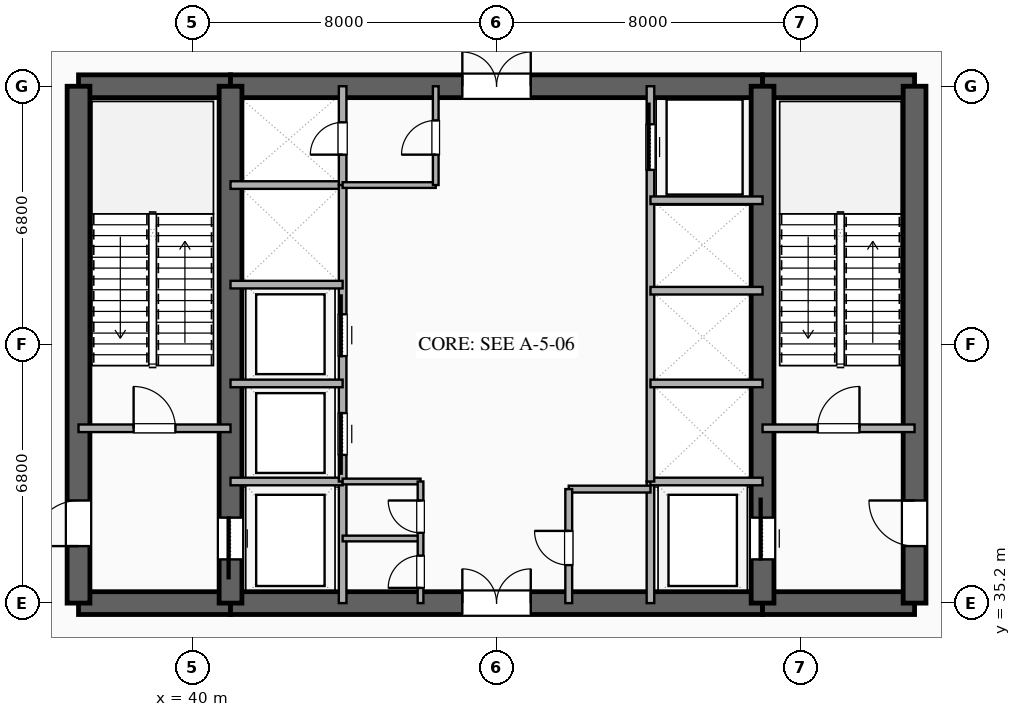
"""IFC4 building model, lengths in metres.
Left out: names, types, materials, properties, quantities, classifications, styles, units other than length and angle.
Written with IfcOpenShell. Run it as: python <this file> out.ifc"""

import sys

from ifc_helpers import new_model, si_unit, direction, frame, frame_2d, origin, place, context, subcontext, project, spatial, rectangle, extrude, element, fill, save


model = new_model("IFC4")
c1 = context("Model", 3, precision=1e-05, world=origin(), true_north=direction((0.0, 1.0)))
c2 = subcontext(c1, "Body", "Model", "MODEL_VIEW")
j1 = project(units=[si_unit("LENGTHUNIT", "METRE"), si_unit("PLANEANGLEUNIT", "RADIAN")], contexts=[c1])
p1 = place(None, origin())
s1 = spatial("IfcSite", under=j1, at=p1, CompositionType="ELEMENT")
p2 = place(p1, origin())
s2 = spatial("IfcBuilding", under=s1, at=p2, CompositionType="ELEMENT")
p3 = place(p2, frame((0.0, 0.0, 16.8)))
s3 = spatial("IfcBuildingStorey", under=s2, at=p3, CompositionType="ELEMENT", Elevation=16.8)
p4 = place(p3, frame((37.0, 35.2, 0.0), z_axis=(0.0, 0.0, 1.0), x_axis=(1.0, 0.0, 0.0)))
e1 = element("IfcWall", 1, at=p4, inside=s3, PredefinedType="SHEAR", context=c2, shape_type="SweptSolid", body=[
    extrude(rectangle(XDim=4.0, YDim=0.6, at=frame_2d((2.0, 0.0))), origin(), (0.0, 0.0, 1.0), 5.05),
])
p5 = place(p3, frame((41.0, 35.2, 0.0), z_axis=(0.0, 0.0, 1.0), x_axis=(1.0, 0.0, 0.0)))
e2 = element("IfcWall", 2, at=p5, inside=s3, PredefinedType="SHEAR", context=c2, shape_type="SweptSolid", body=[
    extrude(rectangle(XDim=14.0, YDim=0.6, at=frame_2d((7.0, 0.0))), origin(), (0.0, 0.0, 1.0), 5.05),
])
p6 = place(p5, frame((6.1, 0.0, 0.0)))
e3 = element("IfcOpeningElement", 3, at=p6, cuts=e2, PredefinedType="OPENING", context=c2, shape_type="SweptSolid", body=[
    extrude(rectangle(XDim=1.8, YDim=2.25, at=frame_2d((0.9, 1.125))), frame((0.0, 0.31, 0.0), z_axis=(0.0, -1.0, 0.0), x_axis=(1.0, 0.0, 0.0)), (0.0, 0.0, 1.0), 0.62),
])
for number, where, z_axis, x_axis in (
    (4, (55.0, 35.2, 0.0), (0.0, 0.0, 1.0), (1.0, 0.0, 0.0)),
    (5, (37.0, 48.8, 0.0), (0.0, 0.0, 1.0), (1.0, 0.0, 0.0)),
):
    element("IfcWall", number, at=place(p3, frame(where, z_axis=z_axis, x_axis=x_axis)), inside=s3, PredefinedType="SHEAR", context=c2, shape_type="SweptSolid", body=[
        extrude(rectangle(XDim=4.0, YDim=0.6, at=frame_2d((2.0, 0.0))), origin(), (0.0, 0.0, 1.0), 5.05),
    ])
p7 = place(p3, frame((41.0, 48.8, 0.0), z_axis=(0.0, 0.0, 1.0), x_axis=(1.0, 0.0, 0.0)))
e6 = element("IfcWall", 6, at=p7, inside=s3, PredefinedType="SHEAR", context=c2, shape_type="SweptSolid", body=[
    extrude(rectangle(XDim=14.0, YDim=0.6, at=frame_2d((7.0, 0.0))), origin(), (0.0, 0.0, 1.0), 5.05),
])
p8 = place(p7, frame((6.1, 0.0, 0.0)))
e7 = element("IfcOpeningElement", 7, at=p8, cuts=e6, PredefinedType="OPENING", context=c2, shape_type="SweptSolid", body=[
    extrude(rectangle(XDim=1.8, YDim=2.25, at=frame_2d((0.9, 1.125))), frame((0.0, 0.31, 0.0), z_axis=(0.0, -1.0, 0.0), x_axis=(1.0, 0.0, 0.0)), (0.0, 0.0, 1.0), 0.62),
])
p9 = place(p3, frame((55.0, 48.8, 0.0), z_axis=(0.0, 0.0, 1.0), x_axis=(1.0, 0.0, 0.0)))
e8 = element("IfcWall", 8, at=p9, inside=s3, PredefinedType="SHEAR", context=c2, shape_type="SweptSolid", body=[
    extrude(rectangle(XDim=4.0, YDim=0.6, at=frame_2d((2.0, 0.0))), origin(), (0.0, 0.0, 1.0), 5.05),
])
p10 = place(p3, frame((37.0, 35.2, 0.0), z_axis=(0.0, 0.0, 1.0), x_axis=(0.0, 1.0, 0.0)))
e9 = element("IfcWall", 9, at=p10, inside=s3, PredefinedType="SHEAR", context=c2, shape_type="SweptSolid", body=[
    extrude(rectangle(XDim=13.6, YDim=0.6, at=frame_2d((6.8, 0.0))), origin(), (0.0, 0.0, 1.0), 5.05),
])
p11 = place(p10, frame((1.5, 0.0, 0.0)))
e10 = element("IfcOpeningElement", 10, at=p11, cuts=e9, PredefinedType="OPENING", context=c2, shape_type="SweptSolid", body=[
    extrude(rectangle(XDim=1.2, YDim=2.15, at=frame_2d((0.6, 1.075))), frame((0.0, 0.31, 0.0), z_axis=(0.0, -1.0, 0.0), x_axis=(1.0, 0.0, 0.0)), (0.0, 0.0, 1.0), 0.62),
])
p12 = place(p3, frame((59.0, 35.2, 0.0), z_axis=(0.0, 0.0, 1.0), x_axis=(0.0, 1.0, 0.0)))
e11 = element("IfcWall", 11, at=p12, inside=s3, PredefinedType="SHEAR", context=c2, shape_type="SweptSolid", body=[
    extrude(rectangle(XDim=13.6, YDim=0.6, at=frame_2d((6.8, 0.0))), origin(), (0.0, 0.0, 1.0), 5.05),
])
p13 = place(p12, frame((1.5, 0.0, 0.0)))
e12 = element("IfcOpeningElement", 12, at=p13, cuts=e11, PredefinedType="OPENING", context=c2, shape_type="SweptSolid", body=[
    extrude(rectangle(XDim=1.2, YDim=2.15, at=frame_2d((0.6, 1.075))), frame((0.0, 0.31, 0.0), z_axis=(0.0, -1.0, 0.0), x_axis=(1.0, 0.0, 0.0)), (0.0, 0.0, 1.0), 0.62),
])
p14 = place(p3, frame((41.0, 35.2, 0.0), z_axis=(0.0, 0.0, 1.0), x_axis=(0.0, 1.0, 0.0)))
e13 = element("IfcWall", 13, at=p14, inside=s3, PredefinedType="SHEAR", context=c2, shape_type="SweptSolid", body=[
    extrude(rectangle(XDim=13.6, YDim=0.6, at=frame_2d((6.8, 0.0))), origin(), (0.0, 0.0, 1.0), 5.05),
])
p15 = place(p14, frame((1.15, 0.0, 0.0)))
e14 = element("IfcOpeningElement", 14, at=p15, cuts=e13, PredefinedType="OPENING", context=c2, shape_type="SweptSolid", body=[
    extrude(rectangle(XDim=1.1, YDim=2.2, at=frame_2d((0.55, 1.1))), frame((0.0, 0.31, 0.0), z_axis=(0.0, -1.0, 0.0), x_axis=(1.0, 0.0, 0.0)), (0.0, 0.0, 1.0), 0.62),
])
p16 = place(p3, frame((55.0, 35.2, 0.0), z_axis=(0.0, 0.0, 1.0), x_axis=(0.0, 1.0, 0.0)))
e15 = element("IfcWall", 15, at=p16, inside=s3, PredefinedType="SHEAR", context=c2, shape_type="SweptSolid", body=[
    extrude(rectangle(XDim=13.6, YDim=0.6, at=frame_2d((6.8, 0.0))), origin(), (0.0, 0.0, 1.0), 5.05),
])
p17 = place(p16, frame((1.15, 0.0, 0.0)))
e16 = element("IfcOpeningElement", 16, at=p17, cuts=e15, PredefinedType="OPENING", context=c2, shape_type="SweptSolid", body=[
    extrude(rectangle(XDim=1.1, YDim=2.2, at=frame_2d((0.55, 1.1))), frame((0.0, 0.31, 0.0), z_axis=(0.0, -1.0, 0.0), x_axis=(1.0, 0.0, 0.0)), (0.0, 0.0, 1.0), 0.62),
])
p18 = place(p3, frame((37.0, 39.8, 0.0), z_axis=(0.0, 0.0, 1.0), x_axis=(1.0, 0.0, 0.0)))
e17 = element("IfcWall", 17, at=p18, inside=s3, PredefinedType="SOLIDWALL", context=c2, shape_type="SweptSolid", body=[
    extrude(rectangle(XDim=4.0, YDim=0.2, at=frame_2d((2.0, 0.0))), origin(), (0.0, 0.0, 1.0), 3.65),
])
p19 = place(p18, frame((1.45, 0.0, 0.0)))
e18 = element("IfcOpeningElement", 18, at=p19, cuts=e17, PredefinedType="OPENING", context=c2, shape_type="SweptSolid", body=[
    extrude(rectangle(XDim=1.1, YDim=2.15, at=frame_2d((0.55, 1.075))), frame((0.0, 0.11, 0.0), z_axis=(0.0, -1.0, 0.0), x_axis=(1.0, 0.0, 0.0)), (0.0, 0.0, 1.0), 0.22),
])
p20 = place(p3, frame((55.0, 39.8, 0.0), z_axis=(0.0, 0.0, 1.0), x_axis=(1.0, 0.0, 0.0)))
e19 = element("IfcWall", 19, at=p20, inside=s3, PredefinedType="SOLIDWALL", context=c2, shape_type="SweptSolid", body=[
    extrude(rectangle(XDim=4.0, YDim=0.2, at=frame_2d((2.0, 0.0))), origin(), (0.0, 0.0, 1.0), 3.65),
])
p21 = place(p20, frame((1.45, 0.0, 0.0)))
e20 = element("IfcOpeningElement", 20, at=p21, cuts=e19, PredefinedType="OPENING", context=c2, shape_type="SweptSolid", body=[
    extrude(rectangle(XDim=1.1, YDim=2.15, at=frame_2d((0.55, 1.075))), frame((0.0, 0.11, 0.0), z_axis=(0.0, -1.0, 0.0), x_axis=(1.0, 0.0, 0.0)), (0.0, 0.0, 1.0), 0.22),
])
p22 = place(p3, frame((43.95, 35.2, 0.0), z_axis=(0.0, 0.0, 1.0), x_axis=(0.0, 1.0, 0.0)))
e21 = element("IfcWall", 21, at=p22, inside=s3, PredefinedType="SOLIDWALL", context=c2, shape_type="SweptSolid", body=[
    extrude(rectangle(XDim=3.2, YDim=0.2, at=frame_2d((1.6, 0.0))), origin(), (0.0, 0.0, 1.0), 3.65),
])
p23 = place(p3, frame((41.0, 38.4, 0.0), z_axis=(0.0, 0.0, 1.0), x_axis=(1.0, 0.0, 0.0)))
e22 = element("IfcWall", 22, at=p23, inside=s3, PredefinedType="SOLIDWALL", context=c2, shape_type="SweptSolid", body=[
    extrude(rectangle(XDim=2.95, YDim=0.2, at=frame_2d((1.475, 0.0))), origin(), (0.0, 0.0, 1.0), 3.65),
])
p24 = place(p3, frame((52.05, 35.2, 0.0), z_axis=(0.0, 0.0, 1.0), x_axis=(0.0, 1.0, 0.0)))
e23 = element("IfcWall", 23, at=p24, inside=s3, PredefinedType="SOLIDWALL", context=c2, shape_type="SweptSolid", body=[
    extrude(rectangle(XDim=3.2, YDim=0.2, at=frame_2d((1.6, 0.0))), origin(), (0.0, 0.0, 1.0), 3.65),
])
for number, where, z_axis, x_axis in (
    (24, (52.05, 38.4, 0.0), (0.0, 0.0, 1.0), (1.0, 0.0, 0.0)),
    (25, (41.0, 46.2, 0.0), (0.0, 0.0, 1.0), (1.0, 0.0, 0.0)),
):
    element("IfcWall", number, at=place(p3, frame(where, z_axis=z_axis, x_axis=x_axis)), inside=s3, PredefinedType="SOLIDWALL", context=c2, shape_type="SweptSolid", body=[
        extrude(rectangle(XDim=2.95, YDim=0.2, at=frame_2d((1.475, 0.0))), origin(), (0.0, 0.0, 1.0), 3.65),
    ])
p25 = place(p3, frame((43.95, 46.2, 0.0), z_axis=(0.0, 0.0, 1.0), x_axis=(0.0, 1.0, 0.0)))
e26 = element("IfcWall", 26, at=p25, inside=s3, PredefinedType="SOLIDWALL", context=c2, shape_type="SweptSolid", body=[
    extrude(rectangle(XDim=2.6, YDim=0.2, at=frame_2d((1.3, 0.0))), origin(), (0.0, 0.0, 1.0), 3.65),
])
p26 = place(p25, frame((0.8, 0.0, 0.0)))
e27 = element("IfcOpeningElement", 27, at=p26, cuts=e26, PredefinedType="OPENING", context=c2, shape_type="SweptSolid", body=[
    extrude(rectangle(XDim=0.85, YDim=2.15, at=frame_2d((0.425, 1.075))), frame((0.0, 0.11, 0.0), z_axis=(0.0, -1.0, 0.0), x_axis=(1.0, 0.0, 0.0)), (0.0, 0.0, 1.0), 0.22),
])
p27 = place(p3, frame((43.95, 38.4, 0.0), z_axis=(0.0, 0.0, 1.0), x_axis=(0.0, 1.0, 0.0)))
e28 = element("IfcWall", 28, at=p27, inside=s3, PredefinedType="SOLIDWALL", context=c2, shape_type="SweptSolid", body=[
    extrude(rectangle(XDim=7.8, YDim=0.2, at=frame_2d((3.9, 0.0))), origin(), (0.0, 0.0, 1.0), 3.65),
])
p28 = place(p27, frame((0.7, 0.0, 0.0)))
e29 = element("IfcOpeningElement", 29, at=p28, cuts=e28, PredefinedType="OPENING", context=c2, shape_type="SweptSolid", body=[
    extrude(rectangle(XDim=1.1, YDim=2.2, at=frame_2d((0.55, 1.1))), frame((0.0, 0.11, 0.0), z_axis=(0.0, -1.0, 0.0), x_axis=(1.0, 0.0, 0.0)), (0.0, 0.0, 1.0), 0.22),
])
p29 = place(p27, frame((3.3, 0.0, 0.0)))
e30 = element("IfcOpeningElement", 30, at=p29, cuts=e28, PredefinedType="OPENING", context=c2, shape_type="SweptSolid", body=[
    extrude(rectangle(XDim=1.1, YDim=2.2, at=frame_2d((0.55, 1.1))), frame((0.0, 0.11, 0.0), z_axis=(0.0, -1.0, 0.0), x_axis=(1.0, 0.0, 0.0)), (0.0, 0.0, 1.0), 0.22),
])
for number, where, z_axis, x_axis in (
    (31, (41.0, 40.98, 0.0), (0.0, 0.0, 1.0), (1.0, 0.0, 0.0)),
    (32, (41.0, 43.58, 0.0), (0.0, 0.0, 1.0), (1.0, 0.0, 0.0)),
):
    element("IfcWall", number, at=place(p3, frame(where, z_axis=z_axis, x_axis=x_axis)), inside=s3, PredefinedType="SOLIDWALL", context=c2, shape_type="SweptSolid", body=[
        extrude(rectangle(XDim=2.95, YDim=0.2, at=frame_2d((1.475, 0.0))), origin(), (0.0, 0.0, 1.0), 3.65),
    ])
p30 = place(p3, frame((52.05, 38.4, 0.0), z_axis=(0.0, 0.0, 1.0), x_axis=(0.0, 1.0, 0.0)))
e33 = element("IfcWall", 33, at=p30, inside=s3, PredefinedType="SOLIDWALL", context=c2, shape_type="SweptSolid", body=[
    extrude(rectangle(XDim=10.4, YDim=0.2, at=frame_2d((5.2, 0.0))), origin(), (0.0, 0.0, 1.0), 3.65),
])
p31 = place(p30, frame((8.2, 0.0, 0.0)))
e34 = element("IfcOpeningElement", 34, at=p31, cuts=e33, PredefinedType="OPENING", context=c2, shape_type="SweptSolid", body=[
    extrude(rectangle(XDim=1.2, YDim=2.2, at=frame_2d((0.6, 1.1))), frame((0.0, 0.11, 0.0), z_axis=(0.0, -1.0, 0.0), x_axis=(1.0, 0.0, 0.0)), (0.0, 0.0, 1.0), 0.22),
])
for number, where, z_axis, x_axis in (
    (35, (52.05, 40.98, 0.0), (0.0, 0.0, 1.0), (1.0, 0.0, 0.0)),
    (36, (52.05, 43.42, 0.0), (0.0, 0.0, 1.0), (1.0, 0.0, 0.0)),
    (37, (52.05, 45.8, 0.0), (0.0, 0.0, 1.0), (1.0, 0.0, 0.0)),
):
    element("IfcWall", number, at=place(p3, frame(where, z_axis=z_axis, x_axis=x_axis)), inside=s3, PredefinedType="SOLIDWALL", context=c2, shape_type="SweptSolid", body=[
        extrude(rectangle(XDim=2.95, YDim=0.2, at=frame_2d((1.475, 0.0))), origin(), (0.0, 0.0, 1.0), 3.65),
    ])
for number, where, z_axis, x_axis in (
    (38, (43.95, 36.9, 0.0), (0.0, 0.0, 1.0), (1.0, 0.0, 0.0)),
    (39, (43.95, 38.4, 0.0), (0.0, 0.0, 1.0), (1.0, 0.0, 0.0)),
):
    element("IfcWall", number, at=place(p3, frame(where, z_axis=z_axis, x_axis=x_axis)), inside=s3, PredefinedType="PARTITIONING", context=c2, shape_type="SweptSolid", body=[
        extrude(rectangle(XDim=2.05, YDim=0.15, at=frame_2d((1.025, 0.0))), origin(), (0.0, 0.0, 1.0), 3.65),
    ])
p32 = place(p3, frame((46.0, 35.2, 0.0), z_axis=(0.0, 0.0, 1.0), x_axis=(0.0, 1.0, 0.0)))
e40 = element("IfcWall", 40, at=p32, inside=s3, PredefinedType="PARTITIONING", context=c2, shape_type="SweptSolid", body=[
    extrude(rectangle(XDim=3.2, YDim=0.15, at=frame_2d((1.6, 0.0))), origin(), (0.0, 0.0, 1.0), 3.65),
])
p33 = place(p32, frame((0.4, 0.0, 0.0)))
e41 = element("IfcOpeningElement", 41, at=p33, cuts=e40, PredefinedType="OPENING", context=c2, shape_type="SweptSolid", body=[
    extrude(rectangle(XDim=0.85, YDim=2.15, at=frame_2d((0.425, 1.075))), frame((0.0, 0.085, 0.0), z_axis=(0.0, -1.0, 0.0), x_axis=(1.0, 0.0, 0.0)), (0.0, 0.0, 1.0), 0.17),
])
p34 = place(p32, frame((1.85, 0.0, 0.0)))
e42 = element("IfcOpeningElement", 42, at=p34, cuts=e40, PredefinedType="OPENING", context=c2, shape_type="SweptSolid", body=[
    extrude(rectangle(XDim=0.85, YDim=2.15, at=frame_2d((0.425, 1.075))), frame((0.0, 0.085, 0.0), z_axis=(0.0, -1.0, 0.0), x_axis=(1.0, 0.0, 0.0)), (0.0, 0.0, 1.0), 0.17),
])
p35 = place(p3, frame((43.95, 46.2, 0.0), z_axis=(0.0, 0.0, 1.0), x_axis=(1.0, 0.0, 0.0)))
e43 = element("IfcWall", 43, at=p35, inside=s3, PredefinedType="PARTITIONING", context=c2, shape_type="SweptSolid", body=[
    extrude(rectangle(XDim=2.45, YDim=0.15, at=frame_2d((1.225, 0.0))), origin(), (0.0, 0.0, 1.0), 3.65),
])
p36 = place(p3, frame((46.4, 46.2, 0.0), z_axis=(0.0, 0.0, 1.0), x_axis=(0.0, 1.0, 0.0)))
e44 = element("IfcWall", 44, at=p36, inside=s3, PredefinedType="PARTITIONING", context=c2, shape_type="SweptSolid", body=[
    extrude(rectangle(XDim=2.6, YDim=0.15, at=frame_2d((1.3, 0.0))), origin(), (0.0, 0.0, 1.0), 3.65),
])
p37 = place(p36, frame((0.8, 0.0, 0.0)))
e45 = element("IfcOpeningElement", 45, at=p37, cuts=e44, PredefinedType="OPENING", context=c2, shape_type="SweptSolid", body=[
    extrude(rectangle(XDim=0.9, YDim=2.15, at=frame_2d((0.45, 1.075))), frame((0.0, 0.085, 0.0), z_axis=(0.0, -1.0, 0.0), x_axis=(1.0, 0.0, 0.0)), (0.0, 0.0, 1.0), 0.17),
])
p38 = place(p3, frame((49.9, 38.2, 0.0), z_axis=(0.0, 0.0, 1.0), x_axis=(1.0, 0.0, 0.0)))
e46 = element("IfcWall", 46, at=p38, inside=s3, PredefinedType="PLUMBINGWALL", context=c2, shape_type="SweptSolid", body=[
    extrude(rectangle(XDim=2.15, YDim=0.18, at=frame_2d((1.075, 0.0))), origin(), (0.0, 0.0, 1.0), 3.65),
])
p39 = place(p3, frame((49.9, 35.2, 0.0), z_axis=(0.0, 0.0, 1.0), x_axis=(0.0, 1.0, 0.0)))
e47 = element("IfcWall", 47, at=p39, inside=s3, PredefinedType="PLUMBINGWALL", context=c2, shape_type="SweptSolid", body=[
    extrude(rectangle(XDim=3.0, YDim=0.18, at=frame_2d((1.5, 0.0))), origin(), (0.0, 0.0, 1.0), 3.65),
])
p40 = place(p39, frame((1.0, 0.0, 0.0)))
e48 = element("IfcOpeningElement", 48, at=p40, cuts=e47, PredefinedType="OPENING", context=c2, shape_type="SweptSolid", body=[
    extrude(rectangle(XDim=0.9, YDim=2.1, at=frame_2d((0.45, 1.05))), frame((0.0, 0.1, 0.0), z_axis=(0.0, -1.0, 0.0), x_axis=(1.0, 0.0, 0.0)), (0.0, 0.0, 1.0), 0.2),
])
p41 = place(p15, origin())
e49 = element("IfcDoor", 49, at=p41, inside=s3, OperationType="SLIDING_TO_LEFT", PredefinedType="DOOR", context=c2, shape_type="SweptSolid", body=[
    extrude(rectangle(XDim=1.1, YDim=2.2, at=frame_2d((0.55, 1.1))), frame((0.0, 0.025, 0.0), z_axis=(0.0, -1.0, 0.0), x_axis=(1.0, 0.0, 0.0)), (0.0, 0.0, 1.0), 0.05),
])
fill(e14, e49)
p42 = place(p17, origin())
e50 = element("IfcDoor", 50, at=p42, inside=s3, OperationType="SLIDING_TO_RIGHT", PredefinedType="DOOR", context=c2, shape_type="SweptSolid", body=[
    extrude(rectangle(XDim=1.1, YDim=2.2, at=frame_2d((0.55, 1.1))), frame((0.0, 0.025, 0.0), z_axis=(0.0, -1.0, 0.0), x_axis=(1.0, 0.0, 0.0)), (0.0, 0.0, 1.0), 0.05),
])
fill(e16, e50)
p43 = place(p11, origin())
e51 = element("IfcDoor", 51, at=p43, inside=s3, OperationType="SINGLE_SWING_LEFT", PredefinedType="DOOR", context=c2, shape_type="SweptSolid", body=[
    extrude(rectangle(XDim=1.2, YDim=2.15, at=frame_2d((0.6, 1.075))), frame((0.0, 0.025, 0.0), z_axis=(0.0, -1.0, 0.0), x_axis=(1.0, 0.0, 0.0)), (0.0, 0.0, 1.0), 0.05),
])
fill(e10, e51)
p44 = place(p13, origin())
e52 = element("IfcDoor", 52, at=p44, inside=s3, OperationType="SINGLE_SWING_RIGHT", PredefinedType="DOOR", context=c2, shape_type="SweptSolid", body=[
    extrude(rectangle(XDim=1.2, YDim=2.15, at=frame_2d((0.6, 1.075))), frame((0.0, 0.025, 0.0), z_axis=(0.0, -1.0, 0.0), x_axis=(1.0, 0.0, 0.0)), (0.0, 0.0, 1.0), 0.05),
])
fill(e12, e52)
p45 = place(p6, origin())
e53 = element("IfcDoor", 53, at=p45, inside=s3, OperationType="DOUBLE_DOOR_SINGLE_SWING", PredefinedType="DOOR", context=c2, shape_type="SweptSolid", body=[
    extrude(rectangle(XDim=1.8, YDim=2.25, at=frame_2d((0.9, 1.125))), frame((0.0, 0.025, 0.0), z_axis=(0.0, -1.0, 0.0), x_axis=(1.0, 0.0, 0.0)), (0.0, 0.0, 1.0), 0.05),
])
fill(e3, e53)
p46 = place(p8, origin())
e54 = element("IfcDoor", 54, at=p46, inside=s3, OperationType="DOUBLE_DOOR_SINGLE_SWING", PredefinedType="DOOR", context=c2, shape_type="SweptSolid", body=[
    extrude(rectangle(XDim=1.8, YDim=2.25, at=frame_2d((0.9, 1.125))), frame((0.0, 0.025, 0.0), z_axis=(0.0, -1.0, 0.0), x_axis=(1.0, 0.0, 0.0)), (0.0, 0.0, 1.0), 0.05),
])
fill(e7, e54)
p47 = place(p19, origin())
e55 = element("IfcDoor", 55, at=p47, inside=s3, OperationType="SINGLE_SWING_LEFT", PredefinedType="DOOR", context=c2, shape_type="SweptSolid", body=[
    extrude(rectangle(XDim=1.1, YDim=2.15, at=frame_2d((0.55, 1.075))), frame((0.0, 0.025, 0.0), z_axis=(0.0, -1.0, 0.0), x_axis=(1.0, 0.0, 0.0)), (0.0, 0.0, 1.0), 0.05),
])
fill(e18, e55)
p48 = place(p21, origin())
e56 = element("IfcDoor", 56, at=p48, inside=s3, OperationType="SINGLE_SWING_RIGHT", PredefinedType="DOOR", context=c2, shape_type="SweptSolid", body=[
    extrude(rectangle(XDim=1.1, YDim=2.15, at=frame_2d((0.55, 1.075))), frame((0.0, 0.025, 0.0), z_axis=(0.0, -1.0, 0.0), x_axis=(1.0, 0.0, 0.0)), (0.0, 0.0, 1.0), 0.05),
])
fill(e20, e56)
p49 = place(p26, origin())
e57 = element("IfcDoor", 57, at=p49, inside=s3, OperationType="SINGLE_SWING_LEFT", PredefinedType="DOOR", context=c2, shape_type="SweptSolid", body=[
    extrude(rectangle(XDim=0.85, YDim=2.15, at=frame_2d((0.425, 1.075))), frame((0.0, 0.025, 0.0), z_axis=(0.0, -1.0, 0.0), x_axis=(1.0, 0.0, 0.0)), (0.0, 0.0, 1.0), 0.05),
])
fill(e27, e57)
p50 = place(p28, origin())
e58 = element("IfcDoor", 58, at=p50, inside=s3, OperationType="SLIDING_TO_LEFT", PredefinedType="DOOR", context=c2, shape_type="SweptSolid", body=[
    extrude(rectangle(XDim=1.1, YDim=2.2, at=frame_2d((0.55, 1.1))), frame((0.0, 0.025, 0.0), z_axis=(0.0, -1.0, 0.0), x_axis=(1.0, 0.0, 0.0)), (0.0, 0.0, 1.0), 0.05),
])
fill(e29, e58)
p51 = place(p29, origin())
e59 = element("IfcDoor", 59, at=p51, inside=s3, OperationType="SLIDING_TO_RIGHT", PredefinedType="DOOR", context=c2, shape_type="SweptSolid", body=[
    extrude(rectangle(XDim=1.1, YDim=2.2, at=frame_2d((0.55, 1.1))), frame((0.0, 0.025, 0.0), z_axis=(0.0, -1.0, 0.0), x_axis=(1.0, 0.0, 0.0)), (0.0, 0.0, 1.0), 0.05),
])
fill(e30, e59)
p52 = place(p31, origin())
e60 = element("IfcDoor", 60, at=p52, inside=s3, OperationType="SLIDING_TO_RIGHT", PredefinedType="DOOR", context=c2, shape_type="SweptSolid", body=[
    extrude(rectangle(XDim=1.2, YDim=2.2, at=frame_2d((0.6, 1.1))), frame((0.0, 0.025, 0.0), z_axis=(0.0, -1.0, 0.0), x_axis=(1.0, 0.0, 0.0)), (0.0, 0.0, 1.0), 0.05),
])
fill(e34, e60)
p53 = place(p33, origin())
e61 = element("IfcDoor", 61, at=p53, inside=s3, OperationType="SINGLE_SWING_LEFT", PredefinedType="DOOR", context=c2, shape_type="SweptSolid", body=[
    extrude(rectangle(XDim=0.85, YDim=2.15, at=frame_2d((0.425, 1.075))), frame((0.0, 0.025, 0.0), z_axis=(0.0, -1.0, 0.0), x_axis=(1.0, 0.0, 0.0)), (0.0, 0.0, 1.0), 0.05),
])
fill(e41, e61)
p54 = place(p34, origin())
e62 = element("IfcDoor", 62, at=p54, inside=s3, OperationType="SINGLE_SWING_RIGHT", PredefinedType="DOOR", context=c2, shape_type="SweptSolid", body=[
    extrude(rectangle(XDim=0.85, YDim=2.15, at=frame_2d((0.425, 1.075))), frame((0.0, 0.025, 0.0), z_axis=(0.0, -1.0, 0.0), x_axis=(1.0, 0.0, 0.0)), (0.0, 0.0, 1.0), 0.05),
])
fill(e42, e62)
p55 = place(p37, origin())
e63 = element("IfcDoor", 63, at=p55, inside=s3, OperationType="SINGLE_SWING_LEFT", PredefinedType="DOOR", context=c2, shape_type="SweptSolid", body=[
    extrude(rectangle(XDim=0.9, YDim=2.15, at=frame_2d((0.45, 1.075))), frame((0.0, 0.025, 0.0), z_axis=(0.0, -1.0, 0.0), x_axis=(1.0, 0.0, 0.0)), (0.0, 0.0, 1.0), 0.05),
])
fill(e45, e63)
p56 = place(p40, origin())
e64 = element("IfcDoor", 64, at=p56, inside=s3, OperationType="SINGLE_SWING_RIGHT", PredefinedType="DOOR", context=c2, shape_type="SweptSolid", body=[
    extrude(rectangle(XDim=0.9, YDim=2.1, at=frame_2d((0.45, 1.05))), frame((0.0, 0.025, 0.0), z_axis=(0.0, -1.0, 0.0), x_axis=(1.0, 0.0, 0.0)), (0.0, 0.0, 1.0), 0.05),
])
fill(e48, e64)
save(model, sys.argv[1])
